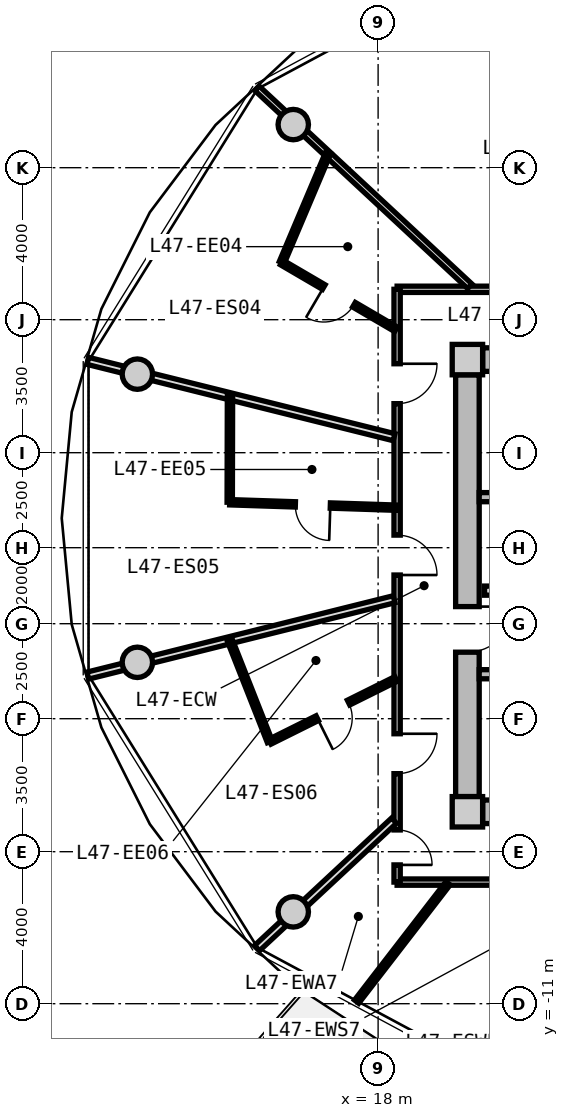
"""IFC4 building model, lengths in metres.
Left out: names, types, materials, properties, quantities, classifications, styles, units other than length and angle.
Written with IfcOpenShell. Run it as: python <this file> out.ifc"""

import sys

from ifc_helpers import new_model, si_unit, direction, frame, frame_2d, origin, origin_2d, place, context, subcontext, project, spatial, rectangle, circle, extrude, source, transform, mapped, element, fill, save


model = new_model("IFC4")
c1 = context("Model", 3, precision=1e-05, world=origin(), true_north=direction((0.0, 1.0)))
c2 = subcontext(c1, "Body", "Model", "MODEL_VIEW")
j1 = project(units=[si_unit("LENGTHUNIT", "METRE"), si_unit("PLANEANGLEUNIT", "RADIAN")], contexts=[c1])
p1 = place(None, origin())
s1 = spatial("IfcSite", under=j1, at=p1, CompositionType="ELEMENT")
p2 = place(p1, origin())
s2 = spatial("IfcBuilding", under=s1, at=p2, CompositionType="ELEMENT")
p3 = place(p2, frame((0.0, 0.0, 152.6)))
s3 = spatial("IfcBuildingStorey", under=s2, at=p3, CompositionType="ELEMENT", Elevation=152.6)
m1 = source(origin(), c2, "Body", "SweptSolid", [
    extrude(rectangle(XDim=0.8, YDim=0.8, at=origin_2d()), origin(), (0.0, 0.0, 1.0), 3.05),
])
for number, where, z_axis, x_axis in (
    (1, (20.35, -5.95, 0.0), (0.0, 0.0, 1.0), (1.0, 0.0, 0.0)),
    (2, (20.35, 5.95, 0.0), (0.0, 0.0, 1.0), (1.0, 0.0, 0.0)),
):
    element("IfcColumn", number, at=place(p3, frame(where, z_axis=z_axis, x_axis=x_axis)), inside=s3, PredefinedType="COLUMN", context=c2, shape_type="MappedRepresentation", body=[
        mapped(m1, transform((0.0, 0.0, 0.0), x_axis=(1.0, 0.0, 0.0), y_axis=(0.0, 1.0, 0.0), z_axis=(0.0, 0.0, 1.0), scale=1.0)),
    ])
m2 = source(origin(), c2, "Body", "SweptSolid", [
    extrude(rectangle(XDim=14.5, YDim=0.62, at=frame_2d((7.25, 0.0))), origin(), (0.0, 0.0, 1.0), 2.81),
])
for number, where, z_axis, x_axis in (
    (3, (20.75, 5.95, 0.0), (0.0, 0.0, 1.0), (1.0, 0.0, 0.0)),
    (4, (35.25, -5.95, 0.0), (0.0, 0.0, 1.0), (-1.0, 0.0, 0.0)),
):
    element("IfcWall", number, at=place(p3, frame(where, z_axis=z_axis, x_axis=x_axis)), inside=s3, PredefinedType="SHEAR", context=c2, shape_type="MappedRepresentation", body=[
        mapped(m2, transform((0.0, 0.0, 0.0), x_axis=(1.0, 0.0, 0.0), y_axis=(0.0, 1.0, 0.0), z_axis=(0.0, 0.0, 1.0), scale=1.0)),
    ])
m3 = source(origin(), c2, "Body", "SweptSolid", [
    extrude(rectangle(XDim=11.1, YDim=0.62, at=frame_2d((5.55, 0.0))), origin(), (0.0, 0.0, 1.0), 2.81),
])
p4 = place(p3, frame((20.35, -5.55, 0.0), z_axis=(0.0, 0.0, 1.0), x_axis=(0.0, 1.0, 0.0)))
e5 = element("IfcWall", 5, at=p4, inside=s3, PredefinedType="SHEAR", context=c2, shape_type="MappedRepresentation", body=[
    mapped(m3, transform((0.0, 0.0, 0.0), x_axis=(1.0, 0.0, 0.0), y_axis=(0.0, 1.0, 0.0), z_axis=(0.0, 0.0, 1.0), scale=1.0)),
])
p5 = place(p4, frame((3.8, 0.0, 0.0)))
e6 = element("IfcOpeningElement", 6, at=p5, cuts=e5, PredefinedType="OPENING", context=c2, shape_type="SweptSolid", body=[
    extrude(rectangle(XDim=1.2, YDim=2.15, at=frame_2d((0.6, 1.075))), frame((0.0, 0.32, 0.0), z_axis=(0.0, -1.0, 0.0), x_axis=(1.0, 0.0, 0.0)), (0.0, 0.0, 1.0), 0.64),
])
m4 = source(origin(), c2, "Body", "SweptSolid", [
    extrude(circle(Radius=0.4, at=origin_2d()), origin(), (0.0, 0.0, 1.0), 3.05),
])
for number, where, z_axis, x_axis in (
    (7, (15.767, 12.135, 0.0), (0.0, 0.0, 1.0), (1.0, 0.0, 0.0)),
    (8, (11.665, 5.567, 0.0), (0.0, 0.0, 1.0), (1.0, 0.0, 0.0)),
    (9, (11.665, -2.016, 0.0), (0.0, 0.0, 1.0), (1.0, 0.0, 0.0)),
    (10, (15.767, -8.584, 0.0), (0.0, 0.0, 1.0), (1.0, 0.0, 0.0)),
):
    element("IfcColumn", number, at=place(p3, frame(where, z_axis=z_axis, x_axis=x_axis)), inside=s3, PredefinedType="COLUMN", context=c2, shape_type="MappedRepresentation", body=[
        mapped(m4, transform((0.0, 0.0, 0.0), x_axis=(1.0, 0.0, 0.0), y_axis=(0.0, 1.0, 0.0), z_axis=(0.0, 0.0, 1.0), scale=1.0)),
    ])
m5 = source(origin(), c2, "Body", "SweptSolid", [
    extrude(rectangle(XDim=7.88, YDim=0.24, at=frame_2d((3.94, 0.0))), origin(), (0.0, 0.0, 1.0), 2.81),
])
p6 = place(p3, frame((20.66, 2.33, 0.0), z_axis=(0.0, 0.0, 1.0), x_axis=(1.0, 0.0, 0.0)))
e11 = element("IfcWall", 11, at=p6, inside=s3, PredefinedType="PARTITIONING", context=c2, shape_type="MappedRepresentation", body=[
    mapped(m5, transform((0.0, 0.0, 0.0), x_axis=(1.0, 0.0, 0.0), y_axis=(0.0, 1.0, 0.0), z_axis=(0.0, 0.0, 1.0), scale=1.0)),
])
p7 = place(p3, frame((20.66, -2.33, 0.0), z_axis=(0.0, 0.0, 1.0), x_axis=(1.0, 0.0, 0.0)))
e12 = element("IfcWall", 12, at=p7, inside=s3, PredefinedType="PARTITIONING", context=c2, shape_type="MappedRepresentation", body=[
    mapped(m5, transform((0.0, 0.0, 0.0), x_axis=(1.0, 0.0, 0.0), y_axis=(0.0, 1.0, 0.0), z_axis=(0.0, 0.0, 1.0), scale=1.0)),
])
p8 = place(p7, frame((1.0, 0.0, 0.0)))
e13 = element("IfcOpeningElement", 13, at=p8, cuts=e12, PredefinedType="OPENING", context=c2, shape_type="SweptSolid", body=[
    extrude(rectangle(XDim=1.1, YDim=2.15, at=frame_2d((0.55, 1.075))), frame((0.0, 0.13, 0.0), z_axis=(0.0, -1.0, 0.0), x_axis=(1.0, 0.0, 0.0)), (0.0, 0.0, 1.0), 0.26),
])
m6 = source(origin(), c2, "Body", "SweptSolid", [
    extrude(rectangle(XDim=7.62, YDim=0.24, at=frame_2d((3.81, 0.0))), origin(), (0.0, 0.0, 1.0), 2.795),
])
p9 = place(p3, frame((20.8, -0.13, 0.0), z_axis=(0.0, 0.0, 1.0), x_axis=(1.0, 0.0, 0.0)))
e14 = element("IfcWall", 14, at=p9, inside=s3, PredefinedType="PARTITIONING", context=c2, shape_type="MappedRepresentation", body=[
    mapped(m6, transform((0.0, 0.0, 0.0), x_axis=(1.0, 0.0, 0.0), y_axis=(0.0, 1.0, 0.0), z_axis=(0.0, 0.0, 1.0), scale=1.0)),
])
p10 = place(p9, frame((6.22, 0.0, 0.0)))
e15 = element("IfcOpeningElement", 15, at=p10, cuts=e14, PredefinedType="OPENING", context=c2, shape_type="SweptSolid", body=[
    extrude(rectangle(XDim=1.0, YDim=2.1, at=frame_2d((0.5, 1.05))), frame((0.0, 0.13, 0.0), z_axis=(0.0, -1.0, 0.0), x_axis=(1.0, 0.0, 0.0)), (0.0, 0.0, 1.0), 0.26),
])
p11 = place(p9, frame((2.4, 0.0, 0.0)))
e16 = element("IfcOpeningElement", 16, at=p11, cuts=e14, PredefinedType="OPENING", context=c2, shape_type="SweptSolid", body=[
    extrude(rectangle(XDim=1.0, YDim=2.1, at=frame_2d((0.5, 1.05))), frame((0.0, 0.13, 0.0), z_axis=(0.0, -1.0, 0.0), x_axis=(1.0, 0.0, 0.0)), (0.0, 0.0, 1.0), 0.26),
])
m7 = source(origin(), c2, "Body", "SweptSolid", [
    extrude(rectangle(XDim=8.6, YDim=0.165, at=frame_2d((4.3, 0.0))), origin(), (0.0, 0.0, 1.0), 2.795),
])
p12 = place(p3, frame((18.5, 7.8, 0.0), z_axis=(0.0, 0.0, 1.0), x_axis=(1.0, 0.0, 0.0)))
e17 = element("IfcWall", 17, at=p12, inside=s3, PredefinedType="PARTITIONING", context=c2, shape_type="MappedRepresentation", body=[
    mapped(m7, transform((0.0, 0.0, 0.0), x_axis=(1.0, 0.0, 0.0), y_axis=(0.0, 1.0, 0.0), z_axis=(0.0, 0.0, 1.0), scale=1.0)),
])
p13 = place(p3, frame((27.1, -7.8, 0.0), z_axis=(0.0, 0.0, 1.0), x_axis=(-1.0, 0.0, 0.0)))
e18 = element("IfcWall", 18, at=p13, inside=s3, PredefinedType="PARTITIONING", context=c2, shape_type="MappedRepresentation", body=[
    mapped(m7, transform((0.0, 0.0, 0.0), x_axis=(1.0, 0.0, 0.0), y_axis=(0.0, 1.0, 0.0), z_axis=(0.0, 0.0, 1.0), scale=1.0)),
])
p14 = place(p13, frame((4.625, 0.0, 0.0)))
e19 = element("IfcOpeningElement", 19, at=p14, cuts=e18, PredefinedType="OPENING", context=c2, shape_type="SweptSolid", body=[
    extrude(rectangle(XDim=0.92, YDim=2.1, at=frame_2d((0.46, 1.05))), frame((0.0, 0.093, 0.0), z_axis=(0.0, -1.0, 0.0), x_axis=(1.0, 0.0, 0.0)), (0.0, 0.0, 1.0), 0.185),
])
m8 = source(origin(), c2, "Body", "SweptSolid", [
    extrude(rectangle(XDim=15.6, YDim=0.165, at=frame_2d((7.8, 0.0))), origin(), (0.0, 0.0, 1.0), 2.795),
])
p15 = place(p3, frame((18.5, -7.8, 0.0), z_axis=(0.0, 0.0, 1.0), x_axis=(0.0, 1.0, 0.0)))
e20 = element("IfcWall", 20, at=p15, inside=s3, PredefinedType="PARTITIONING", context=c2, shape_type="MappedRepresentation", body=[
    mapped(m8, transform((0.0, 0.0, 0.0), x_axis=(1.0, 0.0, 0.0), y_axis=(0.0, 1.0, 0.0), z_axis=(0.0, 0.0, 1.0), scale=1.0)),
])
p16 = place(p15, frame((12.591, 0.0, 0.0)))
e21 = element("IfcOpeningElement", 21, at=p16, cuts=e20, PredefinedType="OPENING", context=c2, shape_type="SweptSolid", body=[
    extrude(rectangle(XDim=1.05, YDim=2.15, at=frame_2d((0.525, 1.075))), frame((0.0, 0.093, 0.0), z_axis=(0.0, -1.0, 0.0), x_axis=(1.0, 0.0, 0.0)), (0.0, 0.0, 1.0), 0.185),
])
p17 = place(p15, frame((8.081, 0.0, 0.0)))
e22 = element("IfcOpeningElement", 22, at=p17, cuts=e20, PredefinedType="OPENING", context=c2, shape_type="SweptSolid", body=[
    extrude(rectangle(XDim=1.05, YDim=2.15, at=frame_2d((0.525, 1.075))), frame((0.0, 0.093, 0.0), z_axis=(0.0, -1.0, 0.0), x_axis=(1.0, 0.0, 0.0)), (0.0, 0.0, 1.0), 0.185),
])
p18 = place(p15, frame((2.854, 0.0, 0.0)))
e23 = element("IfcOpeningElement", 23, at=p18, cuts=e20, PredefinedType="OPENING", context=c2, shape_type="SweptSolid", body=[
    extrude(rectangle(XDim=1.05, YDim=2.15, at=frame_2d((0.525, 1.075))), frame((0.0, 0.093, 0.0), z_axis=(0.0, -1.0, 0.0), x_axis=(1.0, 0.0, 0.0)), (0.0, 0.0, 1.0), 0.185),
])
p19 = place(p15, frame((0.452, 0.0, 0.0)))
e24 = element("IfcOpeningElement", 24, at=p19, cuts=e20, PredefinedType="OPENING", context=c2, shape_type="SweptSolid", body=[
    extrude(rectangle(XDim=0.92, YDim=2.1, at=frame_2d((0.46, 1.05))), frame((0.0, 0.093, 0.0), z_axis=(0.0, -1.0, 0.0), x_axis=(1.0, 0.0, 0.0)), (0.0, 0.0, 1.0), 0.185),
])
m9 = source(origin(), c2, "Body", "SweptSolid", [
    extrude(rectangle(XDim=7.648, YDim=0.165, at=frame_2d((3.824, 0.0))), origin(), (0.0, 0.0, 1.0), 2.345),
])
p20 = place(p3, frame((20.413, 7.88, 0.0), z_axis=(0.0, 0.0, 1.0), x_axis=(-0.732182665826, 0.681108320213, 0.0)))
e25 = element("IfcWall", 25, at=p20, inside=s3, PredefinedType="PARTITIONING", context=c2, shape_type="MappedRepresentation", body=[
    mapped(m9, transform((0.0, 0.0, 0.0), x_axis=(1.0, 0.0, 0.0), y_axis=(0.0, 1.0, 0.0), z_axis=(0.0, 0.0, 1.0), scale=1.0)),
])
m10 = source(origin(), c2, "Body", "SweptSolid", [
    extrude(rectangle(XDim=8.305, YDim=0.19, at=frame_2d((4.153, 0.0))), origin(), (0.0, 0.0, 1.0), 2.345),
])
p21 = place(p3, frame((18.42, 3.908, 0.0), z_axis=(0.0, 0.0, 1.0), x_axis=(-0.970309994378, 0.241864662175, 0.0)))
e26 = element("IfcWall", 26, at=p21, inside=s3, PredefinedType="PARTITIONING", context=c2, shape_type="MappedRepresentation", body=[
    mapped(m10, transform((0.0, 0.0, 0.0), x_axis=(1.0, 0.0, 0.0), y_axis=(0.0, 1.0, 0.0), z_axis=(0.0, 0.0, 1.0), scale=1.0)),
])
m11 = source(origin(), c2, "Body", "SweptSolid", [
    extrude(rectangle(XDim=3.481, YDim=0.14, at=frame_2d((1.74, 0.0))), origin(), (0.0, 0.0, 1.0), 2.795),
])
p22 = place(p3, frame((18.47, 6.748, 0.0), z_axis=(0.0, 0.0, 1.0), x_axis=(-0.863310428788, 0.504673264148, 0.0)))
e27 = element("IfcWall", 27, at=p22, inside=s3, PredefinedType="PARTITIONING", context=c2, shape_type="MappedRepresentation", body=[
    mapped(m11, transform((0.0, 0.0, 0.0), x_axis=(1.0, 0.0, 0.0), y_axis=(0.0, 1.0, 0.0), z_axis=(0.0, 0.0, 1.0), scale=1.0)),
])
p23 = place(p22, frame((1.28, 0.0, 0.0)))
e28 = element("IfcOpeningElement", 28, at=p23, cuts=e27, PredefinedType="OPENING", context=c2, shape_type="SweptSolid", body=[
    extrude(rectangle(XDim=0.92, YDim=2.1, at=frame_2d((0.46, 1.05))), frame((0.0, 0.08, 0.0), z_axis=(0.0, -1.0, 0.0), x_axis=(1.0, 0.0, 0.0)), (0.0, 0.0, 1.0), 0.16),
])
m12 = source(origin(), c2, "Body", "SweptSolid", [
    extrude(rectangle(XDim=3.142, YDim=0.14, at=frame_2d((1.571, 0.0))), origin(), (0.0, 0.0, 1.0), 2.795),
])
p24 = place(p3, frame((15.465, 8.504, 0.0), z_axis=(0.0, 0.0, 1.0), x_axis=(0.389855410514, 0.920876082268, 0.0)))
e29 = element("IfcWall", 29, at=p24, inside=s3, PredefinedType="PARTITIONING", context=c2, shape_type="MappedRepresentation", body=[
    mapped(m12, transform((0.0, 0.0, 0.0), x_axis=(1.0, 0.0, 0.0), y_axis=(0.0, 1.0, 0.0), z_axis=(0.0, 0.0, 1.0), scale=1.0)),
])
p25 = place(p3, frame((18.42, -0.357, 0.0), z_axis=(0.0, 0.0, 1.0), x_axis=(-0.970309994378, -0.241864662175, 0.0)))
e30 = element("IfcWall", 30, at=p25, inside=s3, PredefinedType="PARTITIONING", context=c2, shape_type="MappedRepresentation", body=[
    mapped(m10, transform((0.0, 0.0, 0.0), x_axis=(1.0, 0.0, 0.0), y_axis=(0.0, 1.0, 0.0), z_axis=(0.0, 0.0, 1.0), scale=1.0)),
])
m13 = source(origin(), c2, "Body", "SweptSolid", [
    extrude(rectangle(XDim=4.377, YDim=0.14, at=frame_2d((2.188, 0.0))), origin(), (0.0, 0.0, 1.0), 2.795),
])
p26 = place(p3, frame((18.47, 2.053, 0.0), z_axis=(0.0, 0.0, 1.0), x_axis=(-0.99946745582, 0.032631346225, 0.0)))
e31 = element("IfcWall", 31, at=p26, inside=s3, PredefinedType="PARTITIONING", context=c2, shape_type="MappedRepresentation", body=[
    mapped(m13, transform((0.0, 0.0, 0.0), x_axis=(1.0, 0.0, 0.0), y_axis=(0.0, 1.0, 0.0), z_axis=(0.0, 0.0, 1.0), scale=1.0)),
])
p27 = place(p26, frame((1.729, 0.0, 0.0)))
e32 = element("IfcOpeningElement", 32, at=p27, cuts=e31, PredefinedType="OPENING", context=c2, shape_type="SweptSolid", body=[
    extrude(rectangle(XDim=0.92, YDim=2.1, at=frame_2d((0.46, 1.05))), frame((0.0, 0.08, 0.0), z_axis=(0.0, -1.0, 0.0), x_axis=(1.0, 0.0, 0.0)), (0.0, 0.0, 1.0), 0.16),
])
m14 = source(origin(), c2, "Body", "SweptSolid", [
    extrude(rectangle(XDim=2.806, YDim=0.14, at=frame_2d((1.403, 0.0))), origin(), (0.0, 0.0, 1.0), 2.795),
])
p28 = place(p3, frame((14.095, 2.196, 0.0), z_axis=(0.0, 0.0, 1.0), x_axis=(0.002435834444, 0.999997033351, 0.0)))
e33 = element("IfcWall", 33, at=p28, inside=s3, PredefinedType="PARTITIONING", context=c2, shape_type="MappedRepresentation", body=[
    mapped(m14, transform((0.0, 0.0, 0.0), x_axis=(1.0, 0.0, 0.0), y_axis=(0.0, 1.0, 0.0), z_axis=(0.0, 0.0, 1.0), scale=1.0)),
])
m15 = source(origin(), c2, "Body", "SweptSolid", [
    extrude(rectangle(XDim=4.927, YDim=0.19, at=frame_2d((2.463, 0.0))), origin(), (0.0, 0.0, 1.0), 2.345),
])
p29 = place(p3, frame((18.42, -6.183, 0.0), z_axis=(0.0, 0.0, 1.0), x_axis=(-0.732191335987, -0.681098999783, 0.0)))
e34 = element("IfcWall", 34, at=p29, inside=s3, PredefinedType="PARTITIONING", context=c2, shape_type="MappedRepresentation", body=[
    mapped(m15, transform((0.0, 0.0, 0.0), x_axis=(1.0, 0.0, 0.0), y_axis=(0.0, 1.0, 0.0), z_axis=(0.0, 0.0, 1.0), scale=1.0)),
])
m16 = source(origin(), c2, "Body", "SweptSolid", [
    extrude(rectangle(XDim=3.707, YDim=0.14, at=frame_2d((1.854, 0.0))), origin(), (0.0, 0.0, 1.0), 2.795),
])
p30 = place(p3, frame((18.47, -2.456, 0.0), z_axis=(0.0, 0.0, 1.0), x_axis=(-0.895347377717, -0.44536846904, 0.0)))
e35 = element("IfcWall", 35, at=p30, inside=s3, PredefinedType="PARTITIONING", context=c2, shape_type="MappedRepresentation", body=[
    mapped(m16, transform((0.0, 0.0, 0.0), x_axis=(1.0, 0.0, 0.0), y_axis=(0.0, 1.0, 0.0), z_axis=(0.0, 0.0, 1.0), scale=1.0)),
])
p31 = place(p30, frame((1.394, 0.0, 0.0)))
e36 = element("IfcOpeningElement", 36, at=p31, cuts=e35, PredefinedType="OPENING", context=c2, shape_type="SweptSolid", body=[
    extrude(rectangle(XDim=0.92, YDim=2.1, at=frame_2d((0.46, 1.05))), frame((0.0, 0.08, 0.0), z_axis=(0.0, -1.0, 0.0), x_axis=(1.0, 0.0, 0.0)), (0.0, 0.0, 1.0), 0.16),
])
m17 = source(origin(), c2, "Body", "SweptSolid", [
    extrude(rectangle(XDim=2.854, YDim=0.14, at=frame_2d((1.427, 0.0))), origin(), (0.0, 0.0, 1.0), 2.795),
])
p32 = place(p3, frame((15.151, -4.107, 0.0), z_axis=(0.0, 0.0, 1.0), x_axis=(-0.366932834407, 0.930247437532, 0.0)))
e37 = element("IfcWall", 37, at=p32, inside=s3, PredefinedType="PARTITIONING", context=c2, shape_type="MappedRepresentation", body=[
    mapped(m17, transform((0.0, 0.0, 0.0), x_axis=(1.0, 0.0, 0.0), y_axis=(0.0, 1.0, 0.0), z_axis=(0.0, 0.0, 1.0), scale=1.0)),
])
m18 = source(origin(), c2, "Body", "SweptSolid", [
    extrude(rectangle(XDim=3.937, YDim=0.14, at=frame_2d((1.968, 0.0))), origin(), (0.0, 0.0, 1.0), 2.795),
])
p33 = place(p3, frame((19.84, -7.83, 0.0), z_axis=(0.0, 0.0, 1.0), x_axis=(-0.611055586441, -0.79158768957, 0.0)))
e38 = element("IfcWall", 38, at=p33, inside=s3, PredefinedType="PARTITIONING", context=c2, shape_type="MappedRepresentation", body=[
    mapped(m18, transform((0.0, 0.0, 0.0), x_axis=(1.0, 0.0, 0.0), y_axis=(0.0, 1.0, 0.0), z_axis=(0.0, 0.0, 1.0), scale=1.0)),
])
m19 = source(origin(), c2, "Body", "SweptSolid", [
    extrude(rectangle(XDim=1.2, YDim=2.15, at=frame_2d((0.6, 1.075))), frame((0.0, 0.025, 0.0), z_axis=(0.0, -1.0, 0.0), x_axis=(1.0, 0.0, 0.0)), (0.0, 0.0, 1.0), 0.05),
])
p34 = place(p5, frame((1.2, 0.0, 0.0), z_axis=(0.0, 0.0, 1.0), x_axis=(-1.0, 0.0, 0.0)))
e39 = element("IfcDoor", 39, at=p34, inside=s3, OperationType="SINGLE_SWING_LEFT", PredefinedType="DOOR", context=c2, shape_type="MappedRepresentation", body=[
    mapped(m19, transform((0.0, 0.0, 0.0), x_axis=(1.0, 0.0, 0.0), y_axis=(0.0, 1.0, 0.0), z_axis=(0.0, 0.0, 1.0), scale=1.0)),
])
fill(e6, e39)
m20 = source(origin(), c2, "Body", "SweptSolid", [
    extrude(rectangle(XDim=1.05, YDim=2.15, at=frame_2d((0.525, 1.075))), frame((0.0, 0.025, 0.0), z_axis=(0.0, -1.0, 0.0), x_axis=(1.0, 0.0, 0.0)), (0.0, 0.0, 1.0), 0.05),
])
p35 = place(p16, frame((1.05, 0.0, 0.0), z_axis=(0.0, 0.0, 1.0), x_axis=(-1.0, 0.0, 0.0)))
e40 = element("IfcDoor", 40, at=p35, inside=s3, OperationType="SINGLE_SWING_LEFT", PredefinedType="DOOR", context=c2, shape_type="MappedRepresentation", body=[
    mapped(m20, transform((0.0, 0.0, 0.0), x_axis=(1.0, 0.0, 0.0), y_axis=(0.0, 1.0, 0.0), z_axis=(0.0, 0.0, 1.0), scale=1.0)),
])
fill(e21, e40)
m21 = source(origin(), c2, "Body", "SweptSolid", [
    extrude(rectangle(XDim=0.92, YDim=2.1, at=frame_2d((0.46, 1.05))), frame((0.0, 0.025, 0.0), z_axis=(0.0, -1.0, 0.0), x_axis=(1.0, 0.0, 0.0)), (0.0, 0.0, 1.0), 0.05),
])
p36 = place(p23, origin())
e41 = element("IfcDoor", 41, at=p36, inside=s3, OperationType="SINGLE_SWING_RIGHT", PredefinedType="DOOR", context=c2, shape_type="MappedRepresentation", body=[
    mapped(m21, transform((0.0, 0.0, 0.0), x_axis=(1.0, 0.0, 0.0), y_axis=(0.0, 1.0, 0.0), z_axis=(0.0, 0.0, 1.0), scale=1.0)),
])
fill(e28, e41)
p37 = place(p17, frame((1.05, 0.0, 0.0), z_axis=(0.0, 0.0, 1.0), x_axis=(-1.0, 0.0, 0.0)))
e42 = element("IfcDoor", 42, at=p37, inside=s3, OperationType="SINGLE_SWING_RIGHT", PredefinedType="DOOR", context=c2, shape_type="MappedRepresentation", body=[
    mapped(m20, transform((0.0, 0.0, 0.0), x_axis=(1.0, 0.0, 0.0), y_axis=(0.0, 1.0, 0.0), z_axis=(0.0, 0.0, 1.0), scale=1.0)),
])
fill(e22, e42)
p38 = place(p27, origin())
e43 = element("IfcDoor", 43, at=p38, inside=s3, OperationType="SINGLE_SWING_LEFT", PredefinedType="DOOR", context=c2, shape_type="MappedRepresentation", body=[
    mapped(m21, transform((0.0, 0.0, 0.0), x_axis=(1.0, 0.0, 0.0), y_axis=(0.0, 1.0, 0.0), z_axis=(0.0, 0.0, 1.0), scale=1.0)),
])
fill(e32, e43)
p39 = place(p18, frame((1.05, 0.0, 0.0), z_axis=(0.0, 0.0, 1.0), x_axis=(-1.0, 0.0, 0.0)))
e44 = element("IfcDoor", 44, at=p39, inside=s3, OperationType="SINGLE_SWING_LEFT", PredefinedType="DOOR", context=c2, shape_type="MappedRepresentation", body=[
    mapped(m20, transform((0.0, 0.0, 0.0), x_axis=(1.0, 0.0, 0.0), y_axis=(0.0, 1.0, 0.0), z_axis=(0.0, 0.0, 1.0), scale=1.0)),
])
fill(e23, e44)
p40 = place(p31, origin())
e45 = element("IfcDoor", 45, at=p40, inside=s3, OperationType="SINGLE_SWING_RIGHT", PredefinedType="DOOR", context=c2, shape_type="MappedRepresentation", body=[
    mapped(m21, transform((0.0, 0.0, 0.0), x_axis=(1.0, 0.0, 0.0), y_axis=(0.0, 1.0, 0.0), z_axis=(0.0, 0.0, 1.0), scale=1.0)),
])
fill(e36, e45)
p41 = place(p19, frame((0.92, 0.0, 0.0), z_axis=(0.0, 0.0, 1.0), x_axis=(-1.0, 0.0, 0.0)))
e46 = element("IfcDoor", 46, at=p41, inside=s3, OperationType="SINGLE_SWING_RIGHT", PredefinedType="DOOR", context=c2, shape_type="MappedRepresentation", body=[
    mapped(m21, transform((0.0, 0.0, 0.0), x_axis=(1.0, 0.0, 0.0), y_axis=(0.0, 1.0, 0.0), z_axis=(0.0, 0.0, 1.0), scale=1.0)),
])
fill(e24, e46)
save(model, sys.argv[1])
